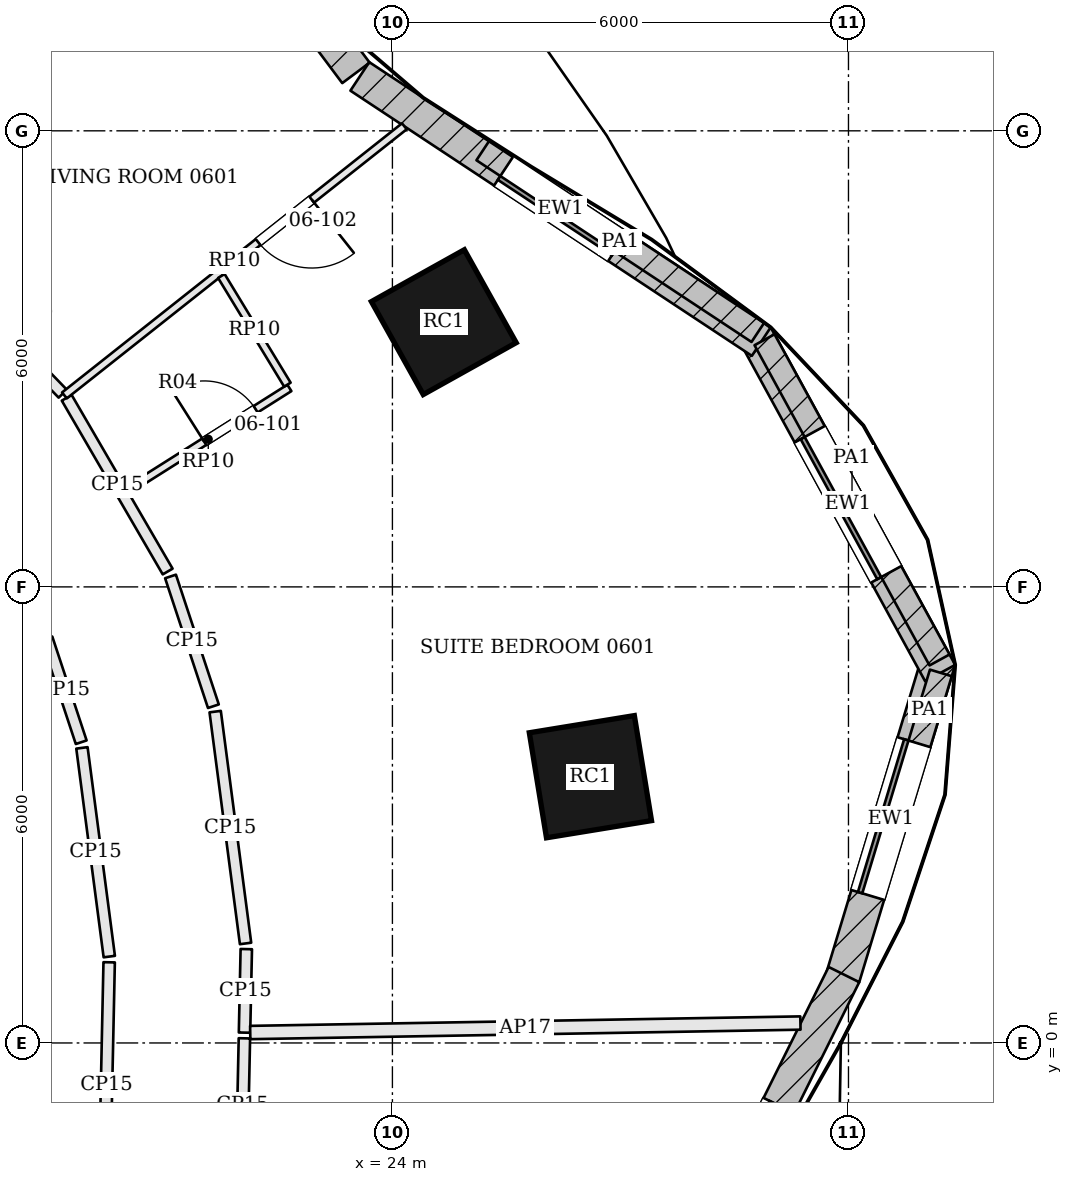
"""IFC4 building model, lengths in metres.
Left out: names, types, materials, properties, quantities, classifications, styles, units other than length and angle.
Written with IfcOpenShell. Run it as: python <this file> out.ifc"""

import sys

from ifc_helpers import new_model, si_unit, direction, frame, frame_2d, origin, origin_2d, place, context, subcontext, project, spatial, rectangle, extrude, element, fill, save


model = new_model("IFC4")
c1 = context("Model", 3, precision=1e-05, world=origin(), true_north=direction((0.0, 1.0)))
c2 = subcontext(c1, "Body", "Model", "MODEL_VIEW")
j1 = project(units=[si_unit("LENGTHUNIT", "METRE"), si_unit("PLANEANGLEUNIT", "RADIAN")], contexts=[c1])
p1 = place(None, origin())
s1 = spatial("IfcSite", under=j1, at=p1, CompositionType="ELEMENT")
p2 = place(p1, origin())
s2 = spatial("IfcBuilding", under=s1, at=p2, CompositionType="ELEMENT")
p3 = place(p2, frame((0.0, 0.0, 37.5)))
s3 = spatial("IfcBuildingStorey", under=s2, at=p3, CompositionType="ELEMENT", Elevation=37.5)
for number, where, z_axis, x_axis in (
    (1, (26.605, 3.503, 0.0), (0.0, 0.0, 1.0), (-0.161, 0.987, 0.0)),
    (2, (24.676, 9.483, 0.0), (0.0, 0.0, 1.0), (-0.487, 0.873, 0.0)),
):
    element("IfcColumn", number, at=place(p3, frame(where, z_axis=z_axis, x_axis=x_axis)), inside=s3, PredefinedType="COLUMN", context=c2, shape_type="SweptSolid", body=[
        extrude(rectangle(XDim=1.4, YDim=1.4, at=origin_2d()), origin(), (0.0, 0.0, 1.0), 3.6),
    ])
p4 = place(p3, frame((29.927, 0.865, 0.0), z_axis=(0.0, 0.0, 1.0), x_axis=(0.289432445378, 0.957198443147, 0.0)))
e3 = element("IfcWall", 3, at=p4, inside=s3, PredefinedType="SOLIDWALL", context=c2, shape_type="SweptSolid", body=[
    extrude(rectangle(XDim=4.361, YDim=0.45, at=frame_2d((2.181, 0.0))), origin(), (0.0, 0.0, 1.0), 3.4),
])
p5 = place(p4, frame((1.131, 0.0, 0.9)))
e4 = element("IfcOpeningElement", 4, at=p5, cuts=e3, PredefinedType="OPENING", context=c2, shape_type="SweptSolid", body=[
    extrude(rectangle(XDim=2.1, YDim=2.0, at=frame_2d((1.05, 1.0))), frame((0.0, 0.235, 0.0), z_axis=(0.0, -1.0, 0.0), x_axis=(1.0, 0.0, 0.0)), (0.0, 0.0, 1.0), 0.47),
])
p6 = place(p3, frame((31.207, 4.866, 0.0), z_axis=(0.0, 0.0, 1.0), x_axis=(-0.479565142605, 0.877506281458, 0.0)))
e5 = element("IfcWall", 5, at=p6, inside=s3, PredefinedType="SOLIDWALL", context=c2, shape_type="SweptSolid", body=[
    extrude(rectangle(XDim=5.061, YDim=0.45, at=frame_2d((2.53, 0.0))), origin(), (0.0, 0.0, 1.0), 3.4),
])
p7 = place(p6, frame((1.48, 0.0, 0.9)))
e6 = element("IfcOpeningElement", 6, at=p7, cuts=e5, PredefinedType="OPENING", context=c2, shape_type="SweptSolid", body=[
    extrude(rectangle(XDim=2.1, YDim=2.0, at=frame_2d((1.05, 1.0))), frame((0.0, 0.235, 0.0), z_axis=(0.0, -1.0, 0.0), x_axis=(1.0, 0.0, 0.0)), (0.0, 0.0, 1.0), 0.47),
])
p8 = place(p3, frame((28.853, 9.227, 0.0), z_axis=(0.0, 0.0, 1.0), x_axis=(-0.834404370393, 0.551152743502, 0.0)))
e7 = element("IfcWall", 7, at=p8, inside=s3, PredefinedType="SOLIDWALL", context=c2, shape_type="SweptSolid", body=[
    extrude(rectangle(XDim=6.33, YDim=0.45, at=frame_2d((3.165, 0.0))), origin(), (0.0, 0.0, 1.0), 3.4),
])
p9 = place(p8, frame((2.265, 0.0, 0.9)))
e8 = element("IfcOpeningElement", 8, at=p9, cuts=e7, PredefinedType="OPENING", context=c2, shape_type="SweptSolid", body=[
    extrude(rectangle(XDim=1.8, YDim=2.0, at=frame_2d((0.9, 1.0))), frame((0.0, 0.235, 0.0), z_axis=(0.0, -1.0, 0.0), x_axis=(1.0, 0.0, 0.0)), (0.0, 0.0, 1.0), 0.47),
])
p10 = place(p3, frame((23.52, 12.762, 0.0), z_axis=(0.0, 0.0, 1.0), x_axis=(-0.598664281495, 0.801000048728, 0.0)))
e9 = element("IfcWall", 9, at=p10, inside=s3, PredefinedType="SOLIDWALL", context=c2, shape_type="SweptSolid", body=[
    extrude(rectangle(XDim=3.482, YDim=0.45, at=frame_2d((1.741, 0.0))), origin(), (0.0, 0.0, 1.0), 3.4),
])
p11 = place(p10, frame((0.691, 0.0, 0.9)))
e10 = element("IfcOpeningElement", 10, at=p11, cuts=e9, PredefinedType="OPENING", context=c2, shape_type="SweptSolid", body=[
    extrude(rectangle(XDim=2.1, YDim=2.0, at=frame_2d((1.05, 1.0))), frame((0.0, 0.235, 0.0), z_axis=(0.0, -1.0, 0.0), x_axis=(1.0, 0.0, 0.0)), (0.0, 0.0, 1.0), 0.47),
])
p12 = place(p3, frame((27.294, -4.427, 0.0), z_axis=(0.0, 0.0, 1.0), x_axis=(0.444913249375, 0.895573671191, 0.0)))
e11 = element("IfcWall", 11, at=p12, inside=s3, PredefinedType="SOLIDWALL", context=c2, shape_type="SweptSolid", body=[
    extrude(rectangle(XDim=5.947, YDim=0.45, at=frame_2d((2.974, 0.0))), origin(), (0.0, 0.0, 1.0), 3.4),
])
p13 = place(p12, frame((1.924, 0.0, 0.9)))
e12 = element("IfcOpeningElement", 12, at=p13, cuts=e11, PredefinedType="OPENING", context=c2, shape_type="SweptSolid", body=[
    extrude(rectangle(XDim=2.1, YDim=2.0, at=frame_2d((1.05, 1.0))), frame((0.0, 0.235, 0.0), z_axis=(0.0, -1.0, 0.0), x_axis=(1.0, 0.0, 0.0)), (0.0, 0.0, 1.0), 0.47),
])
p14 = place(p3, frame((30.924, 3.903, 3.6), z_axis=(0.0, 0.0, 1.0), x_axis=(0.289368862089, 0.95721766681, 0.0)))
e13 = element("IfcWall", 13, at=p14, inside=s3, PredefinedType="PARAPET", context=c2, shape_type="SweptSolid", body=[
    extrude(rectangle(XDim=1.008, YDim=0.3, at=frame_2d((0.504, 0.0))), origin(), (0.0, 0.0, 1.0), 1.1),
])
p15 = place(p3, frame((31.198, 5.039, 3.6), z_axis=(0.0, 0.0, 1.0), x_axis=(-0.479564593641, 0.877506581472, 0.0)))
e14 = element("IfcWall", 14, at=p15, inside=s3, PredefinedType="PARAPET", context=c2, shape_type="SweptSolid", body=[
    extrude(rectangle(XDim=4.801, YDim=0.3, at=frame_2d((2.4, 0.0))), origin(), (0.0, 0.0, 1.0), 1.1),
])
p16 = place(p3, frame((28.807, 9.347, 3.6), z_axis=(0.0, 0.0, 1.0), x_axis=(-0.834398186729, 0.551162104995, 0.0)))
e15 = element("IfcWall", 15, at=p16, inside=s3, PredefinedType="PARAPET", context=c2, shape_type="SweptSolid", body=[
    extrude(rectangle(XDim=4.337, YDim=0.3, at=frame_2d((2.169, 0.0))), origin(), (0.0, 0.0, 1.0), 1.1),
])
p17 = place(p3, frame((22.054, 0.136, 0.0), z_axis=(0.0, 0.0, 1.0), x_axis=(0.021328480471, 0.999772522087, 0.0)))
e16 = element("IfcWall", 16, at=p17, inside=s3, PredefinedType="PARTITIONING", context=c2, shape_type="SweptSolid", body=[
    extrude(rectangle(XDim=1.099, YDim=0.15, at=frame_2d((0.549, 0.0))), origin(), (0.0, 0.0, 1.0), 2.68),
])
p18 = place(p3, frame((22.068, 1.309, 0.0), z_axis=(0.0, 0.0, 1.0), x_axis=(-0.129922755307, 0.991524118543, 0.0)))
e17 = element("IfcWall", 17, at=p18, inside=s3, PredefinedType="PARTITIONING", context=c2, shape_type="SweptSolid", body=[
    extrude(rectangle(XDim=3.076, YDim=0.15, at=frame_2d((1.538, 0.0))), origin(), (0.0, 0.0, 1.0), 2.68),
])
p19 = place(p3, frame((21.645, 4.43, 0.0), z_axis=(0.0, 0.0, 1.0), x_axis=(-0.313700743044, 0.949521902756, 0.0)))
e18 = element("IfcWall", 18, at=p19, inside=s3, PredefinedType="PARTITIONING", context=c2, shape_type="SweptSolid", body=[
    extrude(rectangle(XDim=1.798, YDim=0.15, at=frame_2d((0.899, 0.0))), origin(), (0.0, 0.0, 1.0), 2.68),
])
p20 = place(p3, frame((21.043, 6.202, 0.0), z_axis=(0.0, 0.0, 1.0), x_axis=(-0.502371650135, 0.864651794158, 0.0)))
e19 = element("IfcWall", 19, at=p20, inside=s3, PredefinedType="PARTITIONING", context=c2, shape_type="SweptSolid", body=[
    extrude(rectangle(XDim=2.644, YDim=0.15, at=frame_2d((1.322, 0.0))), origin(), (0.0, 0.0, 1.0), 2.68),
])
p21 = place(p3, frame((19.663, 8.542, 0.0), z_axis=(0.0, 0.0, 1.0), x_axis=(-0.695225869021, 0.718791340407, 0.0)))
e20 = element("IfcWall", 20, at=p21, inside=s3, PredefinedType="PARTITIONING", context=c2, shape_type="SweptSolid", body=[
    extrude(rectangle(XDim=2.745, YDim=0.15, at=frame_2d((1.373, 0.0))), origin(), (0.0, 0.0, 1.0), 2.68),
])
p22 = place(p21, frame((1.024, 0.0, 0.0)))
e21 = element("IfcOpeningElement", 21, at=p22, cuts=e20, PredefinedType="OPENING", context=c2, shape_type="SweptSolid", body=[
    extrude(rectangle(XDim=1.0, YDim=2.1, at=frame_2d((0.5, 1.05))), frame((0.0, 0.085, 0.0), z_axis=(0.0, -1.0, 0.0), x_axis=(1.0, 0.0, 0.0)), (0.0, 0.0, 1.0), 0.17),
])
p23 = place(p3, frame((29.368, 0.262, 0.0), z_axis=(0.0, 0.0, 1.0), x_axis=(-0.999850929157, -0.017266136319, 0.0)))
e22 = element("IfcWall", 22, at=p23, inside=s3, PredefinedType="PARTITIONING", context=c2, shape_type="SweptSolid", body=[
    extrude(rectangle(XDim=7.24, YDim=0.175, at=frame_2d((3.62, 0.0))), origin(), (0.0, 0.0, 1.0), 2.68),
])
p24 = place(p3, frame((19.936, 13.883, 0.0), z_axis=(0.0, 0.0, 1.0), x_axis=(-0.611406081733, -0.791317005516, 0.0)))
e23 = element("IfcWall", 23, at=p24, inside=s3, PredefinedType="PARTITIONING", context=c2, shape_type="SweptSolid", body=[
    extrude(rectangle(XDim=4.026, YDim=0.175, at=frame_2d((2.013, 0.0))), origin(), (0.0, 0.0, 1.0), 2.68),
])
p25 = place(p3, frame((22.003, -2.281, 0.0), z_axis=(0.0, 0.0, 1.0), x_axis=(0.021152119081, 0.999776268901, 0.0)))
e24 = element("IfcWall", 24, at=p25, inside=s3, PredefinedType="PARTITIONING", context=c2, shape_type="SweptSolid", body=[
    extrude(rectangle(XDim=2.343, YDim=0.15, at=frame_2d((1.171, 0.0))), origin(), (0.0, 0.0, 1.0), 2.68),
])
p26 = place(p25, frame((0.45, 0.0, 0.0)))
e25 = element("IfcOpeningElement", 25, at=p26, cuts=e24, PredefinedType="OPENING", context=c2, shape_type="SweptSolid", body=[
    extrude(rectangle(XDim=1.0, YDim=2.1, at=frame_2d((0.5, 1.05))), frame((0.0, 0.085, 0.0), z_axis=(0.0, -1.0, 0.0), x_axis=(1.0, 0.0, 0.0)), (0.0, 0.0, 1.0), 0.17),
])
p27 = place(p3, frame((19.454, 5.324, 0.0), z_axis=(0.0, 0.0, 1.0), x_axis=(0.313632756375, -0.949544361327, 0.0)))
e26 = element("IfcWall", 26, at=p27, inside=s3, PredefinedType="PARTITIONING", context=c2, shape_type="SweptSolid", body=[
    extrude(rectangle(XDim=1.44, YDim=0.15, at=frame_2d((0.72, 0.0))), origin(), (0.0, 0.0, 1.0), 2.68),
])
p28 = place(p3, frame((19.915, 3.882, 0.0), z_axis=(0.0, 0.0, 1.0), x_axis=(0.129945947446, -0.991521079323, 0.0)))
e27 = element("IfcWall", 27, at=p28, inside=s3, PredefinedType="PARTITIONING", context=c2, shape_type="SweptSolid", body=[
    extrude(rectangle(XDim=2.769, YDim=0.15, at=frame_2d((1.385, 0.0))), origin(), (0.0, 0.0, 1.0), 2.68),
])
p29 = place(p3, frame((20.273, 1.061, 0.0), z_axis=(0.0, 0.0, 1.0), x_axis=(-0.021166906337, -0.99977595594, 0.0)))
e28 = element("IfcWall", 28, at=p29, inside=s3, PredefinedType="PARTITIONING", context=c2, shape_type="SweptSolid", body=[
    extrude(rectangle(XDim=3.218, YDim=0.15, at=frame_2d((1.609, 0.0))), origin(), (0.0, 0.0, 1.0), 2.68),
])
p30 = place(p3, frame((24.157, 12.06, 0.0), z_axis=(0.0, 0.0, 1.0), x_axis=(-0.784024125513, -0.620730352579, 0.0)))
e29 = element("IfcWall", 29, at=p30, inside=s3, PredefinedType="PARTITIONING", context=c2, shape_type="SweptSolid", body=[
    extrude(rectangle(XDim=5.704, YDim=0.1, at=frame_2d((2.852, 0.0))), origin(), (0.0, 0.0, 1.0), 2.884),
])
p31 = place(p30, frame((1.554, 0.0, 0.0)))
e30 = element("IfcOpeningElement", 30, at=p31, cuts=e29, PredefinedType="OPENING", context=c2, shape_type="SweptSolid", body=[
    extrude(rectangle(XDim=0.9, YDim=2.4, at=frame_2d((0.45, 1.2))), frame((0.0, 0.06, 0.0), z_axis=(0.0, -1.0, 0.0), x_axis=(1.0, 0.0, 0.0)), (0.0, 0.0, 1.0), 0.12),
])
p32 = place(p3, frame((20.51, 7.268, 0.0), z_axis=(0.0, 0.0, 1.0), x_axis=(0.845139460936, 0.534545874148, 0.0)))
e31 = element("IfcWall", 31, at=p32, inside=s3, PredefinedType="PARTITIONING", context=c2, shape_type="SweptSolid", body=[
    extrude(rectangle(XDim=2.525, YDim=0.1, at=frame_2d((1.262, 0.0))), origin(), (0.0, 0.0, 1.0), 2.884),
])
p33 = place(p32, frame((1.2, 0.0, 0.0)))
e32 = element("IfcOpeningElement", 32, at=p33, cuts=e31, PredefinedType="OPENING", context=c2, shape_type="SweptSolid", body=[
    extrude(rectangle(XDim=0.8, YDim=2.1, at=frame_2d((0.4, 1.05))), frame((0.0, 0.06, 0.0), z_axis=(0.0, -1.0, 0.0), x_axis=(1.0, 0.0, 0.0)), (0.0, 0.0, 1.0), 0.12),
])
p34 = place(p3, frame((22.618, 8.661, 0.0), z_axis=(0.0, 0.0, 1.0), x_axis=(-0.519423656264, 0.854516860754, 0.0)))
e33 = element("IfcWall", 33, at=p34, inside=s3, PredefinedType="PARTITIONING", context=c2, shape_type="SweptSolid", body=[
    extrude(rectangle(XDim=1.673, YDim=0.1, at=frame_2d((0.836, 0.0))), origin(), (0.0, 0.0, 1.0), 2.884),
])
p35 = place(p5, origin())
e34 = element("IfcWindow", 34, at=p35, inside=s3, PartitioningType="SINGLE_PANEL", PredefinedType="WINDOW", context=c2, shape_type="SweptSolid", body=[
    extrude(rectangle(XDim=2.1, YDim=2.0, at=frame_2d((1.05, 1.0))), frame((0.0, 0.135, 0.0), z_axis=(0.0, -1.0, 0.0), x_axis=(1.0, 0.0, 0.0)), (0.0, 0.0, 1.0), 0.06),
])
fill(e4, e34)
p36 = place(p7, origin())
e35 = element("IfcWindow", 35, at=p36, inside=s3, PartitioningType="SINGLE_PANEL", PredefinedType="WINDOW", context=c2, shape_type="SweptSolid", body=[
    extrude(rectangle(XDim=2.1, YDim=2.0, at=frame_2d((1.05, 1.0))), frame((0.0, 0.135, 0.0), z_axis=(0.0, -1.0, 0.0), x_axis=(1.0, 0.0, 0.0)), (0.0, 0.0, 1.0), 0.06),
])
fill(e6, e35)
p37 = place(p9, origin())
e36 = element("IfcWindow", 36, at=p37, inside=s3, PartitioningType="SINGLE_PANEL", PredefinedType="WINDOW", context=c2, shape_type="SweptSolid", body=[
    extrude(rectangle(XDim=1.8, YDim=2.0, at=frame_2d((0.9, 1.0))), frame((0.0, 0.135, 0.0), z_axis=(0.0, -1.0, 0.0), x_axis=(1.0, 0.0, 0.0)), (0.0, 0.0, 1.0), 0.06),
])
fill(e8, e36)
p38 = place(p13, origin())
e37 = element("IfcWindow", 37, at=p38, inside=s3, PartitioningType="SINGLE_PANEL", PredefinedType="WINDOW", context=c2, shape_type="SweptSolid", body=[
    extrude(rectangle(XDim=2.1, YDim=2.0, at=frame_2d((1.05, 1.0))), frame((0.0, 0.135, 0.0), z_axis=(0.0, -1.0, 0.0), x_axis=(1.0, 0.0, 0.0)), (0.0, 0.0, 1.0), 0.06),
])
fill(e12, e37)
p39 = place(p33, origin())
e38 = element("IfcDoor", 38, at=p39, inside=s3, OperationType="SINGLE_SWING_LEFT", PredefinedType="DOOR", context=c2, shape_type="SweptSolid", body=[
    extrude(rectangle(XDim=0.8, YDim=2.1, at=frame_2d((0.4, 1.05))), frame((0.0, 0.025, 0.0), z_axis=(0.0, -1.0, 0.0), x_axis=(1.0, 0.0, 0.0)), (0.0, 0.0, 1.0), 0.05),
])
fill(e32, e38)
p40 = place(p31, origin())
e39 = element("IfcDoor", 39, at=p40, inside=s3, OperationType="SINGLE_SWING_LEFT", PredefinedType="DOOR", context=c2, shape_type="SweptSolid", body=[
    extrude(rectangle(XDim=0.9, YDim=2.4, at=frame_2d((0.45, 1.2))), frame((0.0, 0.025, 0.0), z_axis=(0.0, -1.0, 0.0), x_axis=(1.0, 0.0, 0.0)), (0.0, 0.0, 1.0), 0.05),
])
fill(e30, e39)
save(model, sys.argv[1])
